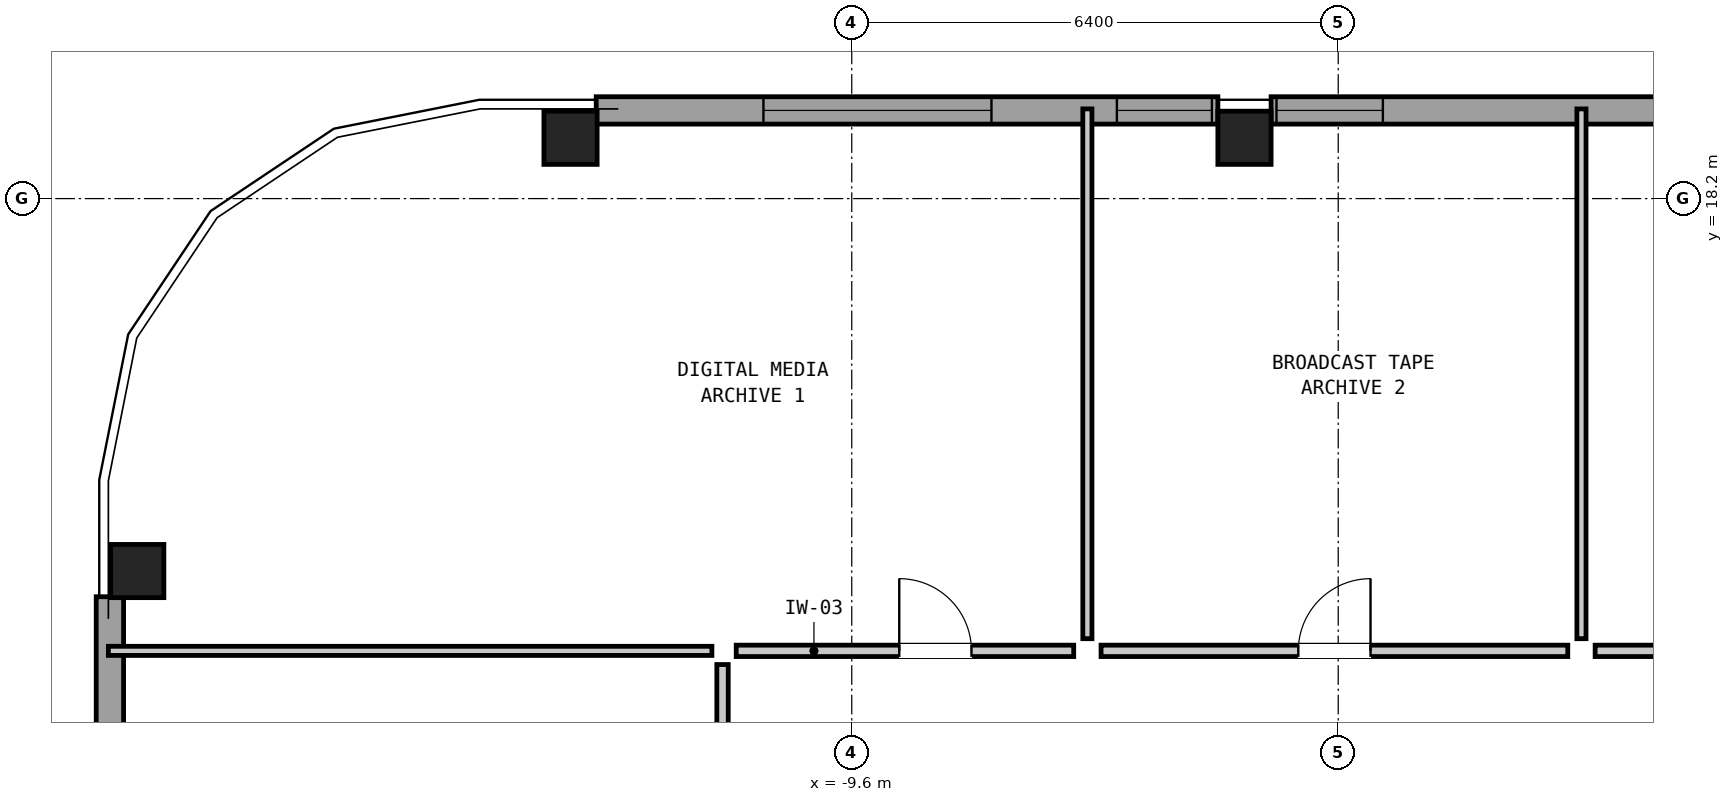
"""IFC4 building model, lengths in metres.
Left out: names, types, materials, properties, quantities, classifications, styles, units other than length and angle.
Written with IfcOpenShell. Run it as: python <this file> out.ifc"""

import sys

from ifc_helpers import new_model, si_unit, direction, frame, frame_2d, origin, origin_2d, place, context, subcontext, project, spatial, rectangle, hollow_rectangle, extrude, element, fill, save


model = new_model("IFC4")
c1 = context("Model", 3, precision=1e-05, world=origin(), true_north=direction((0.0, 1.0)))
c2 = subcontext(c1, "Body", "Model", "MODEL_VIEW")
j1 = project(units=[si_unit("LENGTHUNIT", "METRE"), si_unit("PLANEANGLEUNIT", "RADIAN")], contexts=[c1])
p1 = place(None, origin())
s1 = spatial("IfcSite", under=j1, at=p1, CompositionType="ELEMENT")
p2 = place(p1, origin())
s2 = spatial("IfcBuilding", under=s1, at=p2, CompositionType="ELEMENT")
p3 = place(p2, frame((0.0, 0.0, 220.85)))
s3 = spatial("IfcBuildingStorey", under=s2, at=p3, CompositionType="ELEMENT", Elevation=220.85)
for number, where, z_axis, x_axis in (
    (1, (-4.433, 19.0, 0.0), (0.0, 0.0, 1.0), (1.0, 0.0, 0.0)),
    (2, (-13.3, 19.0, 0.0), (0.0, 0.0, 1.0), (1.0, 0.0, 0.0)),
    (3, (-19.0, 13.3, 0.0), (0.0, 0.0, 1.0), (0.0, 1.0, 0.0)),
):
    element("IfcColumn", number, at=place(p3, frame(where, z_axis=z_axis, x_axis=x_axis)), inside=s3, PredefinedType="COLUMN", context=c2, shape_type="SweptSolid", body=[
        extrude(hollow_rectangle(XDim=0.7, YDim=0.7, WallThickness=0.045, at=origin_2d()), origin(), (0.0, 0.0, 1.0), 3.05),
    ])
p4 = place(p3, frame((-12.962, 19.36, 0.0), z_axis=(0.0, 0.0, 1.0), x_axis=(1.0, 0.0, 0.0)))
e4 = element("IfcWall", 4, at=p4, inside=s3, PredefinedType="SOLIDWALL", context=c2, shape_type="SweptSolid", body=[
    extrude(rectangle(XDim=8.179, YDim=0.36, at=frame_2d((4.089, 0.0))), origin(), (0.0, 0.0, 1.0), 2.374),
])
p5 = place(p4, frame((2.2, 0.0, 0.2)))
e5 = element("IfcOpeningElement", 5, at=p5, cuts=e4, PredefinedType="OPENING", context=c2, shape_type="SweptSolid", body=[
    extrude(rectangle(XDim=3.0, YDim=1.0, at=frame_2d((1.5, 0.5))), frame((0.0, 0.192, 0.0), z_axis=(0.0, -1.0, 0.0), x_axis=(1.0, 0.0, 0.0)), (0.0, 0.0, 1.0), 0.384),
])
p6 = place(p4, frame((6.85, 0.0, 0.95)))
e6 = element("IfcOpeningElement", 6, at=p6, cuts=e4, PredefinedType="OPENING", context=c2, shape_type="SweptSolid", body=[
    extrude(rectangle(XDim=1.25, YDim=1.25, at=frame_2d((0.625, 0.625))), frame((0.0, 0.192, 0.0), z_axis=(0.0, -1.0, 0.0), x_axis=(1.0, 0.0, 0.0)), (0.0, 0.0, 1.0), 0.384),
])
p7 = place(p3, frame((-4.083, 19.36, 0.0), z_axis=(0.0, 0.0, 1.0), x_axis=(1.0, 0.0, 0.0)))
e7 = element("IfcWall", 7, at=p7, inside=s3, PredefinedType="SOLIDWALL", context=c2, shape_type="SweptSolid", body=[
    extrude(rectangle(XDim=8.167, YDim=0.36, at=frame_2d((4.083, 0.0))), origin(), (0.0, 0.0, 1.0), 2.374),
])
p8 = place(p7, frame((0.071, 0.0, 1.25)))
e8 = element("IfcOpeningElement", 8, at=p8, cuts=e7, PredefinedType="OPENING", context=c2, shape_type="SweptSolid", body=[
    extrude(rectangle(XDim=1.4, YDim=0.95, at=frame_2d((0.7, 0.475))), frame((0.0, 0.192, 0.0), z_axis=(0.0, -1.0, 0.0), x_axis=(1.0, 0.0, 0.0)), (0.0, 0.0, 1.0), 0.384),
])
p9 = place(p7, frame((6.521, 0.0, 1.35)))
e9 = element("IfcOpeningElement", 9, at=p9, cuts=e7, PredefinedType="OPENING", context=c2, shape_type="SweptSolid", body=[
    extrude(rectangle(XDim=1.6, YDim=0.85, at=frame_2d((0.8, 0.425))), frame((0.0, 0.192, 0.0), z_axis=(0.0, -1.0, 0.0), x_axis=(1.0, 0.0, 0.0)), (0.0, 0.0, 1.0), 0.384),
])
p10 = place(p3, frame((-19.36, 4.783, 0.0), z_axis=(0.0, 0.0, 1.0), x_axis=(0.0, 1.0, 0.0)))
e10 = element("IfcWall", 10, at=p10, inside=s3, PredefinedType="SOLIDWALL", context=c2, shape_type="SweptSolid", body=[
    extrude(rectangle(XDim=8.179, YDim=0.36, at=frame_2d((4.089, 0.0))), origin(), (0.0, 0.0, 1.0), 2.374),
])
p11 = place(p10, frame((0.055, 0.0, 1.1)))
e11 = element("IfcOpeningElement", 11, at=p11, cuts=e10, PredefinedType="OPENING", context=c2, shape_type="SweptSolid", body=[
    extrude(rectangle(XDim=1.75, YDim=1.1, at=frame_2d((0.875, 0.55))), frame((0.0, 0.192, 0.0), z_axis=(0.0, -1.0, 0.0), x_axis=(1.0, 0.0, 0.0)), (0.0, 0.0, 1.0), 0.384),
])
p12 = place(p10, frame((2.805, 0.0, 0.2)))
e12 = element("IfcOpeningElement", 12, at=p12, cuts=e10, PredefinedType="OPENING", context=c2, shape_type="SweptSolid", body=[
    extrude(rectangle(XDim=3.35, YDim=1.0, at=frame_2d((1.675, 0.5))), frame((0.0, 0.192, 0.0), z_axis=(0.0, -1.0, 0.0), x_axis=(1.0, 0.0, 0.0)), (0.0, 0.0, 1.0), 0.384),
])
p13 = place(p3, frame((-19.38, 12.25, 0.0), z_axis=(0.0, 0.0, 1.0), x_axis=(1.0, 0.0, 0.0)))
e13 = element("IfcWall", 13, at=p13, inside=s3, PredefinedType="PARTITIONING", context=c2, shape_type="SweptSolid", body=[
    extrude(rectangle(XDim=7.94, YDim=0.12, at=frame_2d((3.97, 0.0))), origin(), (0.0, 0.0, 1.0), 2.86),
])
for number, where, z_axis, x_axis in (
    (14, (-6.5, 12.41, 0.0), (0.0, 0.0, 1.0), (0.0, 1.0, 0.0)),
    (15, (0.0, 12.41, 0.0), (0.0, 0.0, 1.0), (0.0, 1.0, 0.0)),
):
    element("IfcWall", number, at=place(p3, frame(where, z_axis=z_axis, x_axis=x_axis)), inside=s3, PredefinedType="PARTITIONING", context=c2, shape_type="SweptSolid", body=[
        extrude(rectangle(XDim=6.97, YDim=0.12, at=frame_2d((3.485, 0.0))), origin(), (0.0, 0.0, 1.0), 2.381),
    ])
p14 = place(p3, frame((-11.12, 12.25, 0.0), z_axis=(0.0, 0.0, 1.0), x_axis=(1.0, 0.0, 0.0)))
e16 = element("IfcWall", 16, at=p14, inside=s3, PredefinedType="PARTITIONING", context=c2, shape_type="SweptSolid", body=[
    extrude(rectangle(XDim=4.44, YDim=0.15, at=frame_2d((2.22, 0.0))), origin(), (0.0, 0.0, 1.0), 2.86),
])
p15 = place(p14, frame((2.145, 0.0, 0.0)))
e17 = element("IfcOpeningElement", 17, at=p15, cuts=e16, PredefinedType="OPENING", context=c2, shape_type="SweptSolid", body=[
    extrude(rectangle(XDim=0.95, YDim=2.1, at=frame_2d((0.475, 1.05))), frame((0.0, 0.087, 0.0), z_axis=(0.0, -1.0, 0.0), x_axis=(1.0, 0.0, 0.0)), (0.0, 0.0, 1.0), 0.174),
])
p16 = place(p3, frame((-6.32, 12.25, 0.0), z_axis=(0.0, 0.0, 1.0), x_axis=(1.0, 0.0, 0.0)))
e18 = element("IfcWall", 18, at=p16, inside=s3, PredefinedType="PARTITIONING", context=c2, shape_type="SweptSolid", body=[
    extrude(rectangle(XDim=6.14, YDim=0.15, at=frame_2d((3.07, 0.0))), origin(), (0.0, 0.0, 1.0), 2.86),
])
p17 = place(p16, frame((2.595, 0.0, 0.0)))
e19 = element("IfcOpeningElement", 19, at=p17, cuts=e18, PredefinedType="OPENING", context=c2, shape_type="SweptSolid", body=[
    extrude(rectangle(XDim=0.95, YDim=2.1, at=frame_2d((0.475, 1.05))), frame((0.0, 0.087, 0.0), z_axis=(0.0, -1.0, 0.0), x_axis=(1.0, 0.0, 0.0)), (0.0, 0.0, 1.0), 0.174),
])
p18 = place(p3, frame((0.18, 12.25, 0.0), z_axis=(0.0, 0.0, 1.0), x_axis=(1.0, 0.0, 0.0)))
e20 = element("IfcWall", 20, at=p18, inside=s3, PredefinedType="PARTITIONING", context=c2, shape_type="SweptSolid", body=[
    extrude(rectangle(XDim=6.14, YDim=0.15, at=frame_2d((3.07, 0.0))), origin(), (0.0, 0.0, 1.0), 2.86),
])
p19 = place(p18, frame((2.595, 0.0, 0.0)))
e21 = element("IfcOpeningElement", 21, at=p19, cuts=e20, PredefinedType="OPENING", context=c2, shape_type="SweptSolid", body=[
    extrude(rectangle(XDim=0.95, YDim=2.1, at=frame_2d((0.475, 1.05))), frame((0.0, 0.087, 0.0), z_axis=(0.0, -1.0, 0.0), x_axis=(1.0, 0.0, 0.0)), (0.0, 0.0, 1.0), 0.174),
])
p20 = place(p3, frame((-11.3, 3.68, 0.0), z_axis=(0.0, 0.0, 1.0), x_axis=(0.0, 1.0, 0.0)))
e22 = element("IfcWall", 22, at=p20, inside=s3, PredefinedType="PARTITIONING", context=c2, shape_type="SweptSolid", body=[
    extrude(rectangle(XDim=8.39, YDim=0.15, at=frame_2d((4.195, 0.0))), origin(), (0.0, 0.0, 1.0), 2.86),
])
p21 = place(p20, frame((3.72, 0.0, 0.0)))
e23 = element("IfcOpeningElement", 23, at=p21, cuts=e22, PredefinedType="OPENING", context=c2, shape_type="SweptSolid", body=[
    extrude(rectangle(XDim=0.95, YDim=2.1, at=frame_2d((0.475, 1.05))), frame((0.0, 0.087, 0.0), z_axis=(0.0, -1.0, 0.0), x_axis=(1.0, 0.0, 0.0)), (0.0, 0.0, 1.0), 0.174),
])
p22 = place(p5, origin())
e24 = element("IfcWindow", 24, at=p22, inside=s3, PartitioningType="SINGLE_PANEL", PredefinedType="WINDOW", context=c2, shape_type="SweptSolid", body=[
    extrude(rectangle(XDim=3.0, YDim=1.0, at=frame_2d((1.5, 0.5))), frame((0.0, 0.03, 0.0), z_axis=(0.0, -1.0, 0.0), x_axis=(1.0, 0.0, 0.0)), (0.0, 0.0, 1.0), 0.06),
])
fill(e5, e24)
p23 = place(p6, origin())
e25 = element("IfcWindow", 25, at=p23, inside=s3, PartitioningType="SINGLE_PANEL", PredefinedType="WINDOW", context=c2, shape_type="SweptSolid", body=[
    extrude(rectangle(XDim=1.25, YDim=1.25, at=frame_2d((0.625, 0.625))), frame((0.0, 0.03, 0.0), z_axis=(0.0, -1.0, 0.0), x_axis=(1.0, 0.0, 0.0)), (0.0, 0.0, 1.0), 0.06),
])
fill(e6, e25)
p24 = place(p8, origin())
e26 = element("IfcWindow", 26, at=p24, inside=s3, PartitioningType="SINGLE_PANEL", PredefinedType="WINDOW", context=c2, shape_type="SweptSolid", body=[
    extrude(rectangle(XDim=1.4, YDim=0.95, at=frame_2d((0.7, 0.475))), frame((0.0, 0.03, 0.0), z_axis=(0.0, -1.0, 0.0), x_axis=(1.0, 0.0, 0.0)), (0.0, 0.0, 1.0), 0.06),
])
fill(e8, e26)
p25 = place(p15, origin())
e27 = element("IfcDoor", 27, at=p25, inside=s3, OperationType="SINGLE_SWING_LEFT", PredefinedType="DOOR", context=c2, shape_type="SweptSolid", body=[
    extrude(rectangle(XDim=0.95, YDim=2.1, at=frame_2d((0.475, 1.05))), frame((0.0, 0.025, 0.0), z_axis=(0.0, -1.0, 0.0), x_axis=(1.0, 0.0, 0.0)), (0.0, 0.0, 1.0), 0.05),
])
fill(e17, e27)
p26 = place(p17, origin())
e28 = element("IfcDoor", 28, at=p26, inside=s3, OperationType="SINGLE_SWING_RIGHT", PredefinedType="DOOR", context=c2, shape_type="SweptSolid", body=[
    extrude(rectangle(XDim=0.95, YDim=2.1, at=frame_2d((0.475, 1.05))), frame((0.0, 0.025, 0.0), z_axis=(0.0, -1.0, 0.0), x_axis=(1.0, 0.0, 0.0)), (0.0, 0.0, 1.0), 0.05),
])
fill(e19, e28)
save(model, sys.argv[1])
